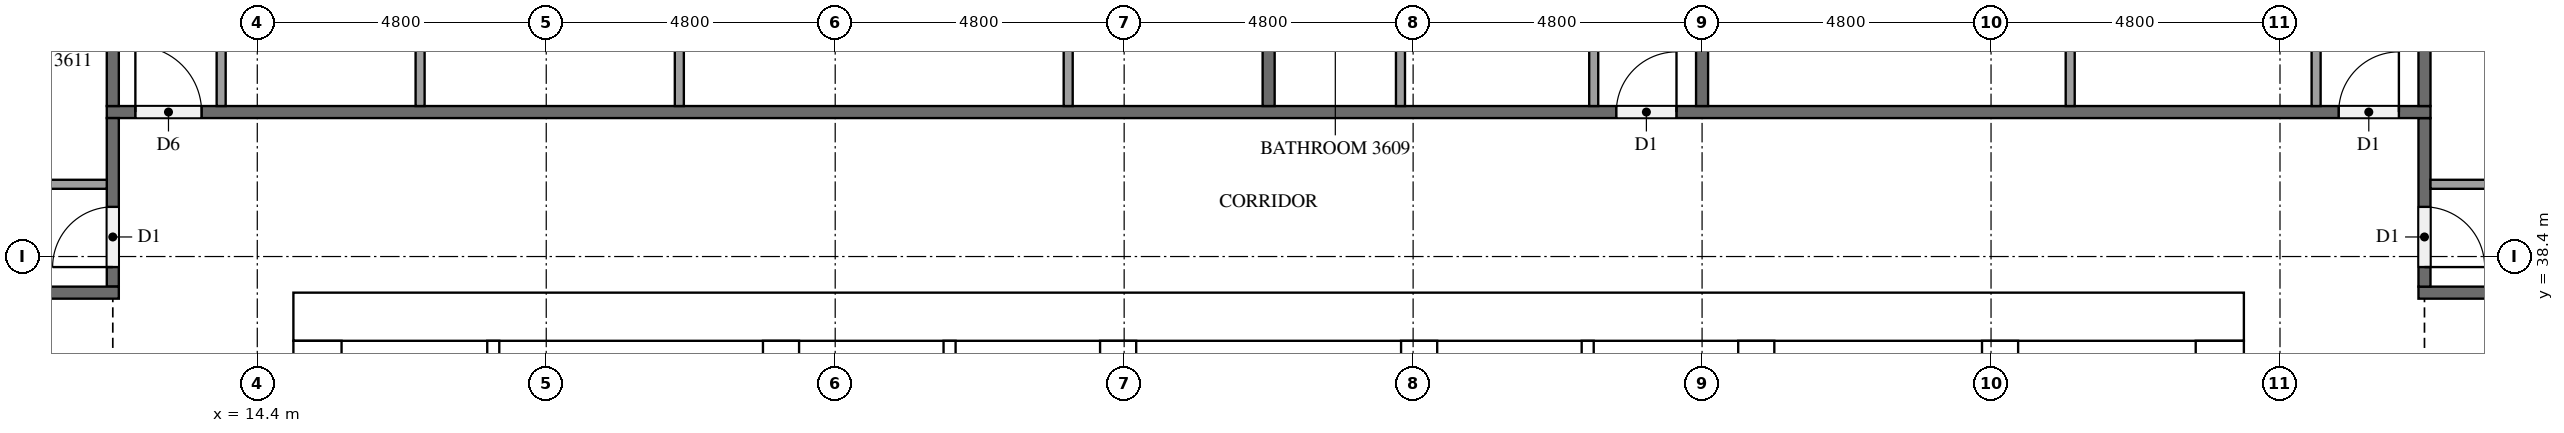
"""IFC4 building model, lengths in metres.
Left out: names, types, materials, properties, quantities, classifications, styles, units other than length and angle.
Written with IfcOpenShell. Run it as: python <this file> out.ifc"""

import sys

from ifc_helpers import new_model, si_unit, direction, frame, frame_2d, origin, place, context, subcontext, project, spatial, rectangle, extrude, element, fill, save


model = new_model("IFC4")
c1 = context("Model", 3, precision=1e-05, world=origin(), true_north=direction((0.0, 1.0)))
c2 = subcontext(c1, "Body", "Model", "MODEL_VIEW")
j1 = project(units=[si_unit("LENGTHUNIT", "METRE"), si_unit("PLANEANGLEUNIT", "RADIAN")], contexts=[c1])
p1 = place(None, origin())
s1 = spatial("IfcSite", under=j1, at=p1, CompositionType="ELEMENT")
p2 = place(p1, origin())
s2 = spatial("IfcBuilding", under=s1, at=p2, CompositionType="ELEMENT")
p3 = place(p2, frame((0.0, 0.0, 140.1)))
s3 = spatial("IfcBuildingStorey", under=s2, at=p3, CompositionType="ELEMENT", Elevation=140.1)
p4 = place(p3, frame((15.0, 37.4, 0.0), z_axis=(0.0, 0.0, 1.0), x_axis=(1.0, 0.0, 0.0)))
e1 = element("IfcWall", 1, at=p4, inside=s3, PredefinedType="SHEAR", context=c2, shape_type="SweptSolid", body=[
    extrude(rectangle(XDim=32.4, YDim=0.8, at=frame_2d((16.2, 0.0))), origin(), (0.0, 0.0, 1.0), 3.1),
])
p5 = place(p4, frame((15.3, 0.0, 0.0)))
e2 = element("IfcOpeningElement", 2, at=p5, cuts=e1, PredefinedType="OPENING", context=c2, shape_type="SweptSolid", body=[
    extrude(rectangle(XDim=1.8, YDim=2.1, at=frame_2d((0.9, 1.05))), frame((0.0, 0.41, 0.0), z_axis=(0.0, -1.0, 0.0), x_axis=(1.0, 0.0, 0.0)), (0.0, 0.0, 1.0), 0.82),
])
p6 = place(p4, frame((1.51, 0.0, 0.0)))
e3 = element("IfcOpeningElement", 3, at=p6, cuts=e1, PredefinedType="OPENING", context=c2, shape_type="SweptSolid", body=[
    extrude(rectangle(XDim=1.0, YDim=2.1, at=frame_2d((0.5, 1.05))), frame((0.0, 0.41, 0.0), z_axis=(0.0, -1.0, 0.0), x_axis=(1.0, 0.0, 0.0)), (0.0, 0.0, 1.0), 0.82),
])
p7 = place(p4, frame((5.11, 0.0, 0.0)))
e4 = element("IfcOpeningElement", 4, at=p7, cuts=e1, PredefinedType="OPENING", context=c2, shape_type="SweptSolid", body=[
    extrude(rectangle(XDim=1.0, YDim=2.1, at=frame_2d((0.5, 1.05))), frame((0.0, 0.41, 0.0), z_axis=(0.0, -1.0, 0.0), x_axis=(1.0, 0.0, 0.0)), (0.0, 0.0, 1.0), 0.82),
])
p8 = place(p3, frame((15.4, 15.8, 0.0), z_axis=(0.0, 0.0, 1.0), x_axis=(0.0, 1.0, 0.0)))
e5 = element("IfcWall", 5, at=p8, inside=s3, PredefinedType="SHEAR", context=c2, shape_type="SweptSolid", body=[
    extrude(rectangle(XDim=21.2, YDim=0.8, at=frame_2d((10.6, 0.0))), origin(), (0.0, 0.0, 1.0), 3.1),
])
p9 = place(p8, frame((4.96, 0.0, 0.0)))
e6 = element("IfcOpeningElement", 6, at=p9, cuts=e5, PredefinedType="OPENING", context=c2, shape_type="SweptSolid", body=[
    extrude(rectangle(XDim=1.2, YDim=2.1, at=frame_2d((0.6, 1.05))), frame((0.0, 0.41, 0.0), z_axis=(0.0, -1.0, 0.0), x_axis=(1.0, 0.0, 0.0)), (0.0, 0.0, 1.0), 0.82),
])
p10 = place(p3, frame((47.0, 15.8, 0.0), z_axis=(0.0, 0.0, 1.0), x_axis=(0.0, 1.0, 0.0)))
e7 = element("IfcWall", 7, at=p10, inside=s3, PredefinedType="SHEAR", context=c2, shape_type="SweptSolid", body=[
    extrude(rectangle(XDim=21.2, YDim=0.8, at=frame_2d((10.6, 0.0))), origin(), (0.0, 0.0, 1.0), 3.1),
])
p11 = place(p10, frame((10.3, 0.0, 0.0)))
e8 = element("IfcOpeningElement", 8, at=p11, cuts=e7, PredefinedType="OPENING", context=c2, shape_type="SweptSolid", body=[
    extrude(rectangle(XDim=1.2, YDim=2.1, at=frame_2d((0.6, 1.05))), frame((0.0, 0.41, 0.0), z_axis=(0.0, -1.0, 0.0), x_axis=(1.0, 0.0, 0.0)), (0.0, 0.0, 1.0), 0.82),
])
p12 = place(p3, frame((23.1, 15.8, 0.0), z_axis=(0.0, 0.0, 1.0), x_axis=(0.0, 1.0, 0.0)))
e9 = element("IfcWall", 9, at=p12, inside=s3, PredefinedType="SHEAR", context=c2, shape_type="SweptSolid", body=[
    extrude(rectangle(XDim=21.2, YDim=0.6, at=frame_2d((10.6, 0.0))), origin(), (0.0, 0.0, 1.0), 3.1),
])
p13 = place(p3, frame((39.3, 27.75, 0.0), z_axis=(0.0, 0.0, 1.0), x_axis=(0.0, 1.0, 0.0)))
e10 = element("IfcWall", 10, at=p13, inside=s3, PredefinedType="SHEAR", context=c2, shape_type="SweptSolid", body=[
    extrude(rectangle(XDim=9.25, YDim=0.6, at=frame_2d((4.625, 0.0))), origin(), (0.0, 0.0, 1.0), 3.1),
])
p14 = place(p3, frame((43.35, 27.75, 0.0), z_axis=(0.0, 0.0, 1.0), x_axis=(0.0, 1.0, 0.0)))
e11 = element("IfcWall", 11, at=p14, inside=s3, PredefinedType="SHEAR", context=c2, shape_type="SweptSolid", body=[
    extrude(rectangle(XDim=9.25, YDim=0.6, at=frame_2d((4.625, 0.0))), origin(), (0.0, 0.0, 1.0), 3.1),
])
p15 = place(p14, frame((7.65, 0.0, 0.0)))
e12 = element("IfcOpeningElement", 12, at=p15, cuts=e11, PredefinedType="OPENING", context=c2, shape_type="SweptSolid", body=[
    extrude(rectangle(XDim=1.2, YDim=2.1, at=frame_2d((0.6, 1.05))), frame((0.0, 0.31, 0.0), z_axis=(0.0, -1.0, 0.0), x_axis=(1.0, 0.0, 0.0)), (0.0, 0.0, 1.0), 0.62),
])
for number, where, z_axis, x_axis in (
    (13, (28.7, 33.85, 0.0), (0.0, 0.0, 1.0), (0.0, 1.0, 0.0)),
    (14, (33.7, 33.85, 0.0), (0.0, 0.0, 1.0), (0.0, 1.0, 0.0)),
):
    element("IfcWall", number, at=place(p3, frame(where, z_axis=z_axis, x_axis=x_axis)), inside=s3, PredefinedType="SHEAR", context=c2, shape_type="SweptSolid", body=[
        extrude(rectangle(XDim=3.15, YDim=0.6, at=frame_2d((1.575, 0.0))), origin(), (0.0, 0.0, 1.0), 3.1),
    ])
for number, where, z_axis, x_axis in (
    (15, (25.9, 33.85, 0.0), (0.0, 0.0, 1.0), (0.0, 1.0, 0.0)),
    (16, (36.5, 33.85, 0.0), (0.0, 0.0, 1.0), (0.0, 1.0, 0.0)),
):
    element("IfcWall", number, at=place(p3, frame(where, z_axis=z_axis, x_axis=x_axis)), inside=s3, PredefinedType="SOLIDWALL", context=c2, shape_type="SweptSolid", body=[
        extrude(rectangle(XDim=3.15, YDim=0.2, at=frame_2d((1.575, 0.0))), origin(), (0.0, 0.0, 1.0), 3.1),
    ])
p16 = place(p3, frame((18.32, 31.55, 0.0), z_axis=(0.0, 0.0, 1.0), x_axis=(0.0, 1.0, 0.0)))
e17 = element("IfcWall", 17, at=p16, inside=s3, PredefinedType="PARTITIONING", context=c2, shape_type="SweptSolid", body=[
    extrude(rectangle(XDim=5.45, YDim=0.2, at=frame_2d((2.725, 0.0))), origin(), (0.0, 0.0, 1.0), 3.1),
])
p17 = place(p3, frame((52.5, 37.8, 0.0), z_axis=(0.0, 0.0, 1.0), x_axis=(-1.0, 0.0, 0.0)))
e18 = element("IfcWall", 18, at=p17, inside=s3, PredefinedType="PARTITIONING", context=c2, shape_type="SweptSolid", body=[
    extrude(rectangle(XDim=2.2, YDim=0.2, at=frame_2d((1.1, 0.0))), origin(), (0.0, 0.0, 1.0), 3.1),
])
p18 = place(p3, frame((50.4, 40.7, 0.0), z_axis=(0.0, 0.0, 1.0), x_axis=(0.0, -1.0, 0.0)))
e19 = element("IfcWall", 19, at=p18, inside=s3, PredefinedType="PARTITIONING", context=c2, shape_type="SweptSolid", body=[
    extrude(rectangle(XDim=2.8, YDim=0.2, at=frame_2d((1.4, 0.0))), origin(), (0.0, 0.0, 1.0), 3.1),
])
p19 = place(p18, frame((1.475, 0.0, 0.0)))
e20 = element("IfcOpeningElement", 20, at=p19, cuts=e19, PredefinedType="OPENING", context=c2, shape_type="SweptSolid", body=[
    extrude(rectangle(XDim=1.0, YDim=2.1, at=frame_2d((0.5, 1.05))), frame((0.0, 0.11, 0.0), z_axis=(0.0, -1.0, 0.0), x_axis=(1.0, 0.0, 0.0)), (0.0, 0.0, 1.0), 0.22),
])
p20 = place(p3, frame((11.9, 40.8, 0.0), z_axis=(0.0, 0.0, 1.0), x_axis=(1.0, 0.0, 0.0)))
e21 = element("IfcWall", 21, at=p20, inside=s3, PredefinedType="PARTITIONING", context=c2, shape_type="SweptSolid", body=[
    extrude(rectangle(XDim=38.6, YDim=0.2, at=frame_2d((19.3, 0.0))), origin(), (0.0, 0.0, 1.0), 3.1),
])
p21 = place(p20, frame((37.075, 0.0, 0.0)))
e22 = element("IfcOpeningElement", 22, at=p21, cuts=e21, PredefinedType="OPENING", context=c2, shape_type="SweptSolid", body=[
    extrude(rectangle(XDim=1.0, YDim=2.1, at=frame_2d((0.5, 1.05))), frame((0.0, 0.11, 0.0), z_axis=(0.0, -1.0, 0.0), x_axis=(1.0, 0.0, 0.0)), (0.0, 0.0, 1.0), 0.22),
])
p22 = place(p20, frame((25.075, 0.0, 0.0)))
e23 = element("IfcOpeningElement", 23, at=p22, cuts=e21, PredefinedType="OPENING", context=c2, shape_type="SweptSolid", body=[
    extrude(rectangle(XDim=1.0, YDim=2.1, at=frame_2d((0.5, 1.05))), frame((0.0, 0.11, 0.0), z_axis=(0.0, -1.0, 0.0), x_axis=(1.0, 0.0, 0.0)), (0.0, 0.0, 1.0), 0.22),
])
p23 = place(p20, frame((0.475, 0.0, 0.0)))
e24 = element("IfcOpeningElement", 24, at=p23, cuts=e21, PredefinedType="OPENING", context=c2, shape_type="SweptSolid", body=[
    extrude(rectangle(XDim=1.1, YDim=2.1, at=frame_2d((0.55, 1.05))), frame((0.0, 0.11, 0.0), z_axis=(0.0, -1.0, 0.0), x_axis=(1.0, 0.0, 0.0)), (0.0, 0.0, 1.0), 0.22),
])
p24 = place(p3, frame((12.0, 37.9, 0.0), z_axis=(0.0, 0.0, 1.0), x_axis=(0.0, 1.0, 0.0)))
e25 = element("IfcWall", 25, at=p24, inside=s3, PredefinedType="PARTITIONING", context=c2, shape_type="SweptSolid", body=[
    extrude(rectangle(XDim=2.8, YDim=0.2, at=frame_2d((1.4, 0.0))), origin(), (0.0, 0.0, 1.0), 3.1),
])
p25 = place(p24, frame((0.325, 0.0, 0.0)))
e26 = element("IfcOpeningElement", 26, at=p25, cuts=e25, PredefinedType="OPENING", context=c2, shape_type="SweptSolid", body=[
    extrude(rectangle(XDim=1.0, YDim=2.1, at=frame_2d((0.5, 1.05))), frame((0.0, 0.11, 0.0), z_axis=(0.0, -1.0, 0.0), x_axis=(1.0, 0.0, 0.0)), (0.0, 0.0, 1.0), 0.22),
])
p26 = place(p3, frame((12.1, 37.8, 0.0), z_axis=(0.0, 0.0, 1.0), x_axis=(-1.0, 0.0, 0.0)))
e27 = element("IfcWall", 27, at=p26, inside=s3, PredefinedType="PARTITIONING", context=c2, shape_type="SweptSolid", body=[
    extrude(rectangle(XDim=2.2, YDim=0.2, at=frame_2d((1.1, 0.0))), origin(), (0.0, 0.0, 1.0), 3.1),
])
for number, where, z_axis, x_axis in (
    (28, (50.4, 40.9, 0.0), (0.0, 0.0, 1.0), (0.0, 1.0, 0.0)),
    (29, (38.4, 52.7, 0.0), (0.0, 0.0, 1.0), (0.0, -1.0, 0.0)),
    (30, (31.2, 52.7, 0.0), (0.0, 0.0, 1.0), (0.0, -1.0, 0.0)),
    (31, (12.0, 52.7, 0.0), (0.0, 0.0, 1.0), (0.0, -1.0, 0.0)),
):
    element("IfcWall", number, at=place(p3, frame(where, z_axis=z_axis, x_axis=x_axis)), inside=s3, PredefinedType="PARTITIONING", context=c2, shape_type="SweptSolid", body=[
        extrude(rectangle(XDim=11.8, YDim=0.2, at=frame_2d((5.9, 0.0))), origin(), (0.0, 0.0, 1.0), 3.1),
    ])
p27 = place(p3, frame((50.5, 39.6, 0.0), z_axis=(0.0, 0.0, 1.0), x_axis=(1.0, 0.0, 0.0)))
e32 = element("IfcWall", 32, at=p27, inside=s3, PredefinedType="PARTITIONING", context=c2, shape_type="SweptSolid", body=[
    extrude(rectangle(XDim=1.925, YDim=0.15, at=frame_2d((0.962, 0.0))), origin(), (0.0, 0.0, 1.0), 3.1),
])
p28 = place(p3, frame((44.515, 40.9, 0.0), z_axis=(0.0, 0.0, 1.0), x_axis=(0.0, 1.0, 0.0)))
e33 = element("IfcWall", 33, at=p28, inside=s3, PredefinedType="PARTITIONING", context=c2, shape_type="SweptSolid", body=[
    extrude(rectangle(XDim=2.975, YDim=0.15, at=frame_2d((1.488, 0.0))), origin(), (0.0, 0.0, 1.0), 3.1),
])
p29 = place(p3, frame((48.6, 40.9, 0.0), z_axis=(0.0, 0.0, 1.0), x_axis=(0.0, 1.0, 0.0)))
e34 = element("IfcWall", 34, at=p29, inside=s3, PredefinedType="PARTITIONING", context=c2, shape_type="SweptSolid", body=[
    extrude(rectangle(XDim=3.125, YDim=0.15, at=frame_2d((1.562, 0.0))), origin(), (0.0, 0.0, 1.0), 3.1),
])
p30 = place(p3, frame((33.39, 40.9, 0.0), z_axis=(0.0, 0.0, 1.0), x_axis=(0.0, 1.0, 0.0)))
e35 = element("IfcWall", 35, at=p30, inside=s3, PredefinedType="PARTITIONING", context=c2, shape_type="SweptSolid", body=[
    extrude(rectangle(XDim=4.325, YDim=0.15, at=frame_2d((2.163, 0.0))), origin(), (0.0, 0.0, 1.0), 3.1),
])
p31 = place(p3, frame((36.6, 40.9, 0.0), z_axis=(0.0, 0.0, 1.0), x_axis=(0.0, 1.0, 0.0)))
e36 = element("IfcWall", 36, at=p31, inside=s3, PredefinedType="PARTITIONING", context=c2, shape_type="SweptSolid", body=[
    extrude(rectangle(XDim=4.475, YDim=0.15, at=frame_2d((2.238, 0.0))), origin(), (0.0, 0.0, 1.0), 3.1),
])
for number, where, z_axis, x_axis in (
    (37, (17.105, 40.9, 0.0), (0.0, 0.0, 1.0), (0.0, 1.0, 0.0)),
    (38, (21.411, 40.9, 0.0), (0.0, 0.0, 1.0), (0.0, 1.0, 0.0)),
    (39, (27.87, 40.9, 0.0), (0.0, 0.0, 1.0), (0.0, 1.0, 0.0)),
):
    element("IfcWall", number, at=place(p3, frame(where, z_axis=z_axis, x_axis=x_axis)), inside=s3, PredefinedType="PARTITIONING", context=c2, shape_type="SweptSolid", body=[
        extrude(rectangle(XDim=2.975, YDim=0.15, at=frame_2d((1.488, 0.0))), origin(), (0.0, 0.0, 1.0), 3.1),
    ])
for number, where, z_axis, x_axis in (
    (40, (13.8, 40.9, 0.0), (0.0, 0.0, 1.0), (0.0, 1.0, 0.0)),
    (41, (11.9, 39.6, 0.0), (0.0, 0.0, 1.0), (-1.0, 0.0, 0.0)),
):
    element("IfcWall", number, at=place(p3, frame(where, z_axis=z_axis, x_axis=x_axis)), inside=s3, PredefinedType="PARTITIONING", context=c2, shape_type="SweptSolid", body=[
        extrude(rectangle(XDim=3.125, YDim=0.15, at=frame_2d((1.562, 0.0))), origin(), (0.0, 0.0, 1.0), 3.1),
    ])
p32 = place(p5, origin())
e42 = element("IfcDoor", 42, at=p32, inside=s3, OperationType="DOUBLE_DOOR_SINGLE_SWING", PredefinedType="DOOR", context=c2, shape_type="SweptSolid", body=[
    extrude(rectangle(XDim=1.8, YDim=2.1, at=frame_2d((0.9, 1.05))), frame((0.0, 0.025, 0.0), z_axis=(0.0, -1.0, 0.0), x_axis=(1.0, 0.0, 0.0)), (0.0, 0.0, 1.0), 0.05),
])
fill(e2, e42)
p33 = place(p6, origin())
e43 = element("IfcDoor", 43, at=p33, inside=s3, OperationType="SINGLE_SWING_LEFT", PredefinedType="DOOR", context=c2, shape_type="SweptSolid", body=[
    extrude(rectangle(XDim=1.0, YDim=2.1, at=frame_2d((0.5, 1.05))), frame((0.0, 0.025, 0.0), z_axis=(0.0, -1.0, 0.0), x_axis=(1.0, 0.0, 0.0)), (0.0, 0.0, 1.0), 0.05),
])
fill(e3, e43)
p34 = place(p7, origin())
e44 = element("IfcDoor", 44, at=p34, inside=s3, OperationType="SINGLE_SWING_RIGHT", PredefinedType="DOOR", context=c2, shape_type="SweptSolid", body=[
    extrude(rectangle(XDim=1.0, YDim=2.1, at=frame_2d((0.5, 1.05))), frame((0.0, 0.025, 0.0), z_axis=(0.0, -1.0, 0.0), x_axis=(1.0, 0.0, 0.0)), (0.0, 0.0, 1.0), 0.05),
])
fill(e4, e44)
p35 = place(p19, origin())
e45 = element("IfcDoor", 45, at=p35, inside=s3, OperationType="SINGLE_SWING_RIGHT", PredefinedType="DOOR", context=c2, shape_type="SweptSolid", body=[
    extrude(rectangle(XDim=1.0, YDim=2.1, at=frame_2d((0.5, 1.05))), frame((0.0, 0.025, 0.0), z_axis=(0.0, -1.0, 0.0), x_axis=(1.0, 0.0, 0.0)), (0.0, 0.0, 1.0), 0.05),
])
fill(e20, e45)
p36 = place(p21, origin())
e46 = element("IfcDoor", 46, at=p36, inside=s3, OperationType="SINGLE_SWING_RIGHT", PredefinedType="DOOR", context=c2, shape_type="SweptSolid", body=[
    extrude(rectangle(XDim=1.0, YDim=2.1, at=frame_2d((0.5, 1.05))), frame((0.0, 0.025, 0.0), z_axis=(0.0, -1.0, 0.0), x_axis=(1.0, 0.0, 0.0)), (0.0, 0.0, 1.0), 0.05),
])
fill(e22, e46)
p37 = place(p22, origin())
e47 = element("IfcDoor", 47, at=p37, inside=s3, OperationType="SINGLE_SWING_RIGHT", PredefinedType="DOOR", context=c2, shape_type="SweptSolid", body=[
    extrude(rectangle(XDim=1.0, YDim=2.1, at=frame_2d((0.5, 1.05))), frame((0.0, 0.025, 0.0), z_axis=(0.0, -1.0, 0.0), x_axis=(1.0, 0.0, 0.0)), (0.0, 0.0, 1.0), 0.05),
])
fill(e23, e47)
p38 = place(p23, origin())
e48 = element("IfcDoor", 48, at=p38, inside=s3, OperationType="SINGLE_SWING_LEFT", PredefinedType="DOOR", context=c2, shape_type="SweptSolid", body=[
    extrude(rectangle(XDim=1.1, YDim=2.1, at=frame_2d((0.55, 1.05))), frame((0.0, 0.025, 0.0), z_axis=(0.0, -1.0, 0.0), x_axis=(1.0, 0.0, 0.0)), (0.0, 0.0, 1.0), 0.05),
])
fill(e24, e48)
p39 = place(p25, origin())
e49 = element("IfcDoor", 49, at=p39, inside=s3, OperationType="SINGLE_SWING_LEFT", PredefinedType="DOOR", context=c2, shape_type="SweptSolid", body=[
    extrude(rectangle(XDim=1.0, YDim=2.1, at=frame_2d((0.5, 1.05))), frame((0.0, 0.025, 0.0), z_axis=(0.0, -1.0, 0.0), x_axis=(1.0, 0.0, 0.0)), (0.0, 0.0, 1.0), 0.05),
])
fill(e26, e49)
save(model, sys.argv[1])
